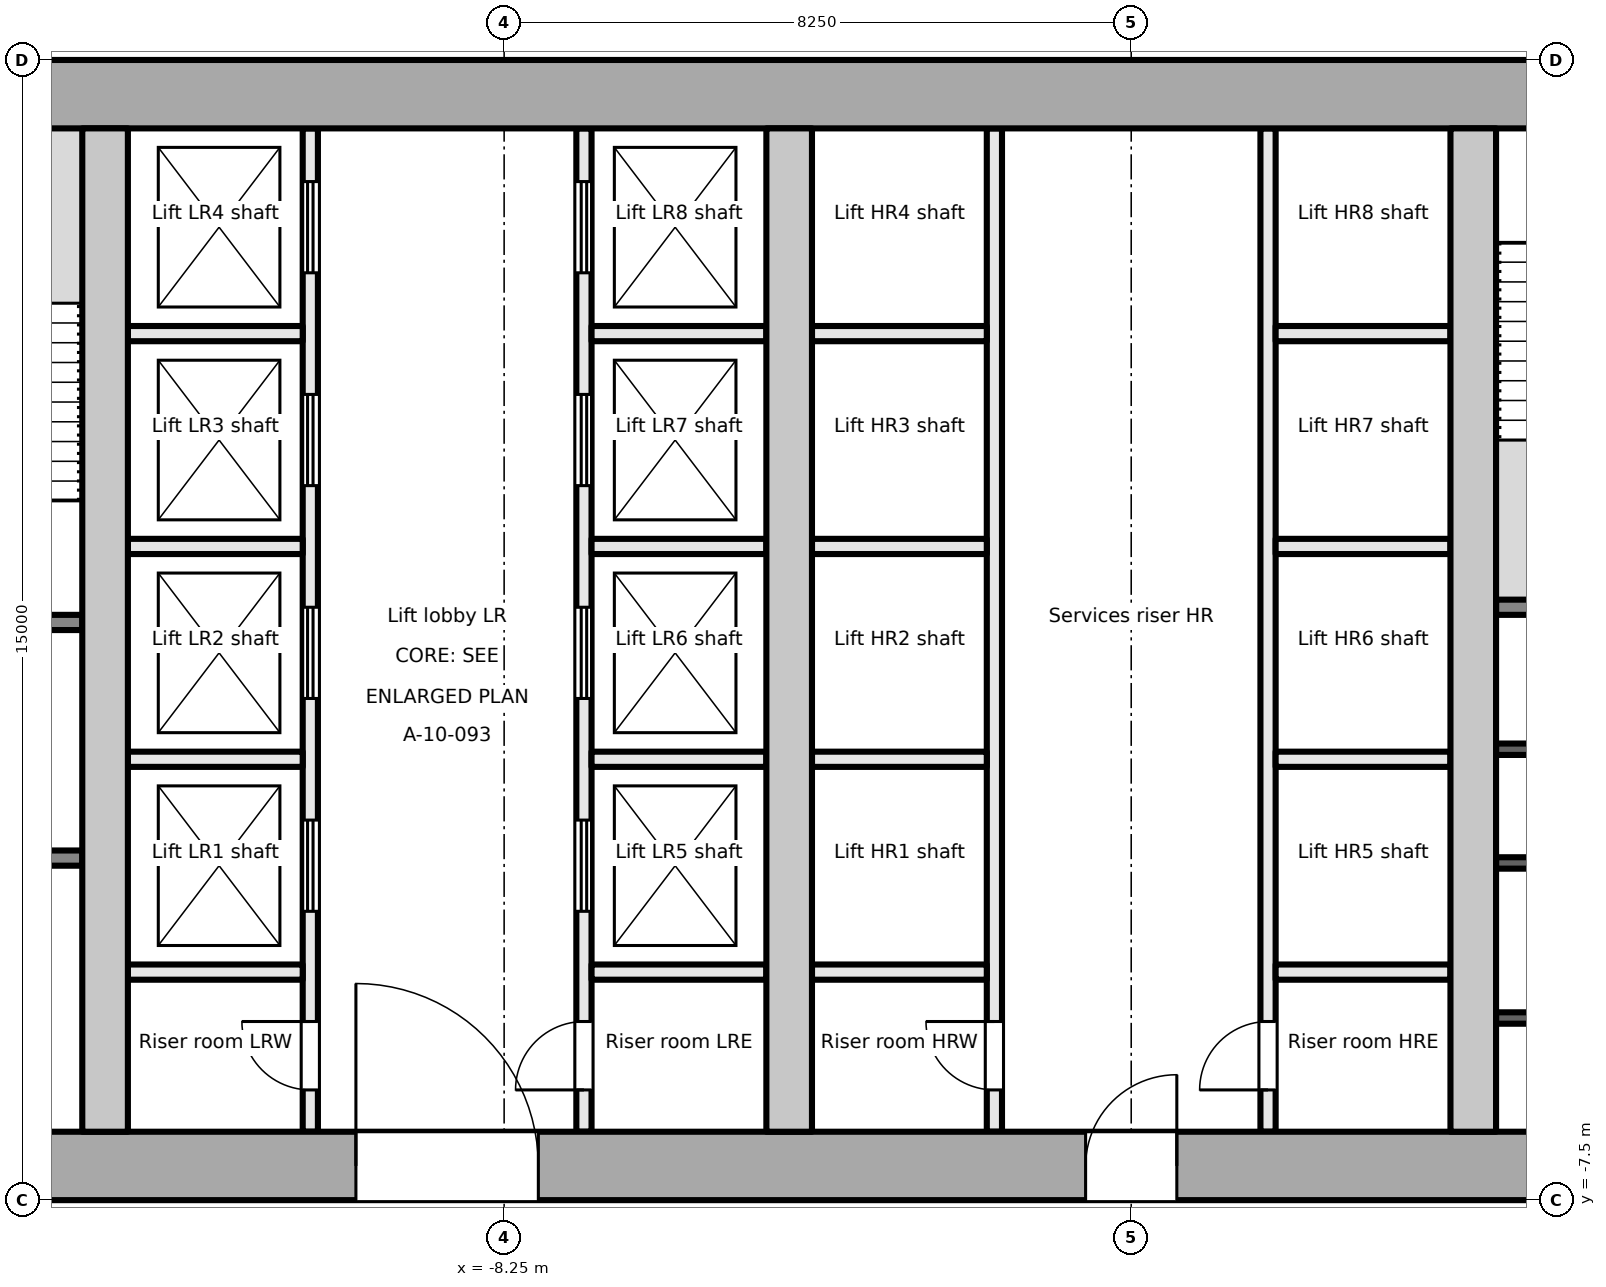
"""IFC4 building model, lengths in metres.
Left out: names, types, materials, properties, quantities, classifications, styles, units other than length and angle.
Written with IfcOpenShell. Run it as: python <this file> out.ifc"""

import sys

from ifc_helpers import new_model, si_unit, direction, frame, frame_2d, origin, place, context, subcontext, project, spatial, rectangle, extrude, element, fill, save


model = new_model("IFC4")
c1 = context("Model", 3, precision=1e-05, world=origin(), true_north=direction((0.0, 1.0)))
c2 = subcontext(c1, "Body", "Model", "MODEL_VIEW")
j1 = project(units=[si_unit("LENGTHUNIT", "METRE"), si_unit("PLANEANGLEUNIT", "RADIAN")], contexts=[c1])
p1 = place(None, origin())
s1 = spatial("IfcSite", under=j1, at=p1, CompositionType="ELEMENT")
p2 = place(p1, origin())
s2 = spatial("IfcBuilding", under=s1, at=p2, CompositionType="ELEMENT")
p3 = place(p2, frame((0.0, 0.0, 99.7)))
s3 = spatial("IfcBuildingStorey", under=s2, at=p3, CompositionType="ELEMENT", Elevation=99.7)
p4 = place(p3, frame((-18.0, -7.05, -0.2), z_axis=(0.0, 0.0, 1.0), x_axis=(1.0, 0.0, 0.0)))
e1 = element("IfcWall", 1, at=p4, inside=s3, PredefinedType="SHEAR", context=c2, shape_type="SweptSolid", body=[
    extrude(rectangle(XDim=36.0, YDim=0.9, at=frame_2d((18.0, 0.0))), origin(), (0.0, 0.0, 1.0), 4.0),
])
p5 = place(p4, frame((7.8, 0.0, 0.2)))
e2 = element("IfcOpeningElement", 2, at=p5, cuts=e1, PredefinedType="OPENING", context=c2, shape_type="SweptSolid", body=[
    extrude(rectangle(XDim=2.4, YDim=2.1, at=frame_2d((1.2, 1.05))), frame((0.0, 0.46, 0.0), z_axis=(0.0, -1.0, 0.0), x_axis=(1.0, 0.0, 0.0)), (0.0, 0.0, 1.0), 0.921),
])
p6 = place(p4, frame((17.4, 0.0, 0.2)))
e3 = element("IfcOpeningElement", 3, at=p6, cuts=e1, PredefinedType="OPENING", context=c2, shape_type="SweptSolid", body=[
    extrude(rectangle(XDim=1.2, YDim=2.1, at=frame_2d((0.6, 1.05))), frame((0.0, 0.46, 0.0), z_axis=(0.0, -1.0, 0.0), x_axis=(1.0, 0.0, 0.0)), (0.0, 0.0, 1.0), 0.921),
])
p7 = place(p4, frame((26.1, 0.0, 0.2)))
e4 = element("IfcOpeningElement", 4, at=p7, cuts=e1, PredefinedType="OPENING", context=c2, shape_type="SweptSolid", body=[
    extrude(rectangle(XDim=2.4, YDim=2.1, at=frame_2d((1.2, 1.05))), frame((0.0, 0.46, 0.0), z_axis=(0.0, -1.0, 0.0), x_axis=(1.0, 0.0, 0.0)), (0.0, 0.0, 1.0), 0.921),
])
p8 = place(p3, frame((-18.0, 7.05, -0.2), z_axis=(0.0, 0.0, 1.0), x_axis=(1.0, 0.0, 0.0)))
e5 = element("IfcWall", 5, at=p8, inside=s3, PredefinedType="SHEAR", context=c2, shape_type="SweptSolid", body=[
    extrude(rectangle(XDim=36.0, YDim=0.9, at=frame_2d((18.0, 0.0))), origin(), (0.0, 0.0, 1.0), 4.0),
])
for number, where, z_axis, x_axis in (
    (6, (-13.5, -6.6, -0.2), (0.0, 0.0, 1.0), (0.0, 1.0, 0.0)),
    (7, (-4.5, -6.6, -0.2), (0.0, 0.0, 1.0), (0.0, 1.0, 0.0)),
    (8, (4.5, -6.6, -0.2), (0.0, 0.0, 1.0), (0.0, 1.0, 0.0)),
):
    element("IfcWall", number, at=place(p3, frame(where, z_axis=z_axis, x_axis=x_axis)), inside=s3, PredefinedType="SHEAR", context=c2, shape_type="SweptSolid", body=[
        extrude(rectangle(XDim=13.2, YDim=0.6, at=frame_2d((6.6, 0.0))), origin(), (0.0, 0.0, 1.0), 4.0),
    ])
p9 = place(p3, frame((-17.1, -3.0, 0.0), z_axis=(0.0, 0.0, 1.0), x_axis=(1.0, 0.0, 0.0)))
e9 = element("IfcWall", 9, at=p9, inside=s3, PredefinedType="PARTITIONING", context=c2, shape_type="SweptSolid", body=[
    extrude(rectangle(XDim=3.3, YDim=0.2, at=frame_2d((1.65, 0.0))), origin(), (0.0, 0.0, 1.0), 3.8),
])
p10 = place(p9, frame((1.1, 0.0, 0.0)))
e10 = element("IfcOpeningElement", 10, at=p10, cuts=e9, PredefinedType="OPENING", context=c2, shape_type="SweptSolid", body=[
    extrude(rectangle(XDim=1.1, YDim=2.1, at=frame_2d((0.55, 1.05))), frame((0.0, 0.111, 0.0), z_axis=(0.0, -1.0, 0.0), x_axis=(1.0, 0.0, 0.0)), (0.0, 0.0, 1.0), 0.221),
])
p11 = place(p3, frame((-17.1, 0.1, 0.0), z_axis=(0.0, 0.0, 1.0), x_axis=(1.0, 0.0, 0.0)))
e11 = element("IfcWall", 11, at=p11, inside=s3, PredefinedType="PARTITIONING", context=c2, shape_type="SweptSolid", body=[
    extrude(rectangle(XDim=3.3, YDim=0.2, at=frame_2d((1.65, 0.0))), origin(), (0.0, 0.0, 1.0), 3.8),
])
p12 = place(p11, frame((1.1, 0.0, 0.0)))
e12 = element("IfcOpeningElement", 12, at=p12, cuts=e11, PredefinedType="OPENING", context=c2, shape_type="SweptSolid", body=[
    extrude(rectangle(XDim=1.1, YDim=2.1, at=frame_2d((0.55, 1.05))), frame((0.0, 0.111, 0.0), z_axis=(0.0, -1.0, 0.0), x_axis=(1.0, 0.0, 0.0)), (0.0, 0.0, 1.0), 0.221),
])
p13 = place(p3, frame((-10.8, -6.6, 0.0), z_axis=(0.0, 0.0, 1.0), x_axis=(0.0, 1.0, 0.0)))
e13 = element("IfcWall", 13, at=p13, inside=s3, PredefinedType="PARTITIONING", context=c2, shape_type="SweptSolid", body=[
    extrude(rectangle(XDim=13.2, YDim=0.2, at=frame_2d((6.6, 0.0))), origin(), (0.0, 0.0, 1.0), 3.8),
])
p14 = place(p13, frame((0.55, 0.0, 0.0)))
e14 = element("IfcOpeningElement", 14, at=p14, cuts=e13, PredefinedType="OPENING", context=c2, shape_type="SweptSolid", body=[
    extrude(rectangle(XDim=0.9, YDim=2.1, at=frame_2d((0.45, 1.05))), frame((0.0, 0.111, 0.0), z_axis=(0.0, -1.0, 0.0), x_axis=(1.0, 0.0, 0.0)), (0.0, 0.0, 1.0), 0.221),
])
p15 = place(p13, frame((2.9, 0.0, 0.0)))
e15 = element("IfcOpeningElement", 15, at=p15, cuts=e13, PredefinedType="OPENING", context=c2, shape_type="SweptSolid", body=[
    extrude(rectangle(XDim=1.2, YDim=2.1, at=frame_2d((0.6, 1.05))), frame((0.0, 0.111, 0.0), z_axis=(0.0, -1.0, 0.0), x_axis=(1.0, 0.0, 0.0)), (0.0, 0.0, 1.0), 0.221),
])
p16 = place(p13, frame((5.7, 0.0, 0.0)))
e16 = element("IfcOpeningElement", 16, at=p16, cuts=e13, PredefinedType="OPENING", context=c2, shape_type="SweptSolid", body=[
    extrude(rectangle(XDim=1.2, YDim=2.1, at=frame_2d((0.6, 1.05))), frame((0.0, 0.111, 0.0), z_axis=(0.0, -1.0, 0.0), x_axis=(1.0, 0.0, 0.0)), (0.0, 0.0, 1.0), 0.221),
])
p17 = place(p13, frame((8.5, 0.0, 0.0)))
e17 = element("IfcOpeningElement", 17, at=p17, cuts=e13, PredefinedType="OPENING", context=c2, shape_type="SweptSolid", body=[
    extrude(rectangle(XDim=1.2, YDim=2.1, at=frame_2d((0.6, 1.05))), frame((0.0, 0.111, 0.0), z_axis=(0.0, -1.0, 0.0), x_axis=(1.0, 0.0, 0.0)), (0.0, 0.0, 1.0), 0.221),
])
p18 = place(p13, frame((11.3, 0.0, 0.0)))
e18 = element("IfcOpeningElement", 18, at=p18, cuts=e13, PredefinedType="OPENING", context=c2, shape_type="SweptSolid", body=[
    extrude(rectangle(XDim=1.2, YDim=2.1, at=frame_2d((0.6, 1.05))), frame((0.0, 0.111, 0.0), z_axis=(0.0, -1.0, 0.0), x_axis=(1.0, 0.0, 0.0)), (0.0, 0.0, 1.0), 0.221),
])
p19 = place(p3, frame((-7.2, -6.6, 0.0), z_axis=(0.0, 0.0, 1.0), x_axis=(0.0, 1.0, 0.0)))
e19 = element("IfcWall", 19, at=p19, inside=s3, PredefinedType="PARTITIONING", context=c2, shape_type="SweptSolid", body=[
    extrude(rectangle(XDim=13.2, YDim=0.2, at=frame_2d((6.6, 0.0))), origin(), (0.0, 0.0, 1.0), 3.8),
])
p20 = place(p19, frame((0.55, 0.0, 0.0)))
e20 = element("IfcOpeningElement", 20, at=p20, cuts=e19, PredefinedType="OPENING", context=c2, shape_type="SweptSolid", body=[
    extrude(rectangle(XDim=0.9, YDim=2.1, at=frame_2d((0.45, 1.05))), frame((0.0, 0.111, 0.0), z_axis=(0.0, -1.0, 0.0), x_axis=(1.0, 0.0, 0.0)), (0.0, 0.0, 1.0), 0.221),
])
p21 = place(p19, frame((2.9, 0.0, 0.0)))
e21 = element("IfcOpeningElement", 21, at=p21, cuts=e19, PredefinedType="OPENING", context=c2, shape_type="SweptSolid", body=[
    extrude(rectangle(XDim=1.2, YDim=2.1, at=frame_2d((0.6, 1.05))), frame((0.0, 0.111, 0.0), z_axis=(0.0, -1.0, 0.0), x_axis=(1.0, 0.0, 0.0)), (0.0, 0.0, 1.0), 0.221),
])
p22 = place(p19, frame((5.7, 0.0, 0.0)))
e22 = element("IfcOpeningElement", 22, at=p22, cuts=e19, PredefinedType="OPENING", context=c2, shape_type="SweptSolid", body=[
    extrude(rectangle(XDim=1.2, YDim=2.1, at=frame_2d((0.6, 1.05))), frame((0.0, 0.111, 0.0), z_axis=(0.0, -1.0, 0.0), x_axis=(1.0, 0.0, 0.0)), (0.0, 0.0, 1.0), 0.221),
])
p23 = place(p19, frame((8.5, 0.0, 0.0)))
e23 = element("IfcOpeningElement", 23, at=p23, cuts=e19, PredefinedType="OPENING", context=c2, shape_type="SweptSolid", body=[
    extrude(rectangle(XDim=1.2, YDim=2.1, at=frame_2d((0.6, 1.05))), frame((0.0, 0.111, 0.0), z_axis=(0.0, -1.0, 0.0), x_axis=(1.0, 0.0, 0.0)), (0.0, 0.0, 1.0), 0.221),
])
p24 = place(p19, frame((11.3, 0.0, 0.0)))
e24 = element("IfcOpeningElement", 24, at=p24, cuts=e19, PredefinedType="OPENING", context=c2, shape_type="SweptSolid", body=[
    extrude(rectangle(XDim=1.2, YDim=2.1, at=frame_2d((0.6, 1.05))), frame((0.0, 0.111, 0.0), z_axis=(0.0, -1.0, 0.0), x_axis=(1.0, 0.0, 0.0)), (0.0, 0.0, 1.0), 0.221),
])
for number, where, z_axis, x_axis in (
    (25, (-13.2, -1.7, 0.0), (0.0, 0.0, 1.0), (1.0, 0.0, 0.0)),
    (26, (-13.2, 1.1, 0.0), (0.0, 0.0, 1.0), (1.0, 0.0, 0.0)),
    (27, (-13.2, 3.9, 0.0), (0.0, 0.0, 1.0), (1.0, 0.0, 0.0)),
    (28, (-13.2, -4.5, 0.0), (0.0, 0.0, 1.0), (1.0, 0.0, 0.0)),
    (29, (-7.1, -1.7, 0.0), (0.0, 0.0, 1.0), (1.0, 0.0, 0.0)),
    (30, (-7.1, 1.1, 0.0), (0.0, 0.0, 1.0), (1.0, 0.0, 0.0)),
    (31, (-7.1, 3.9, 0.0), (0.0, 0.0, 1.0), (1.0, 0.0, 0.0)),
    (32, (-7.1, -4.5, 0.0), (0.0, 0.0, 1.0), (1.0, 0.0, 0.0)),
):
    element("IfcWall", number, at=place(p3, frame(where, z_axis=z_axis, x_axis=x_axis)), inside=s3, PredefinedType="PARTITIONING", context=c2, shape_type="SweptSolid", body=[
        extrude(rectangle(XDim=2.3, YDim=0.2, at=frame_2d((1.15, 0.0))), origin(), (0.0, 0.0, 1.0), 3.8),
    ])
p25 = place(p3, frame((-1.8, -6.6, 0.0), z_axis=(0.0, 0.0, 1.0), x_axis=(0.0, 1.0, 0.0)))
e33 = element("IfcWall", 33, at=p25, inside=s3, PredefinedType="PARTITIONING", context=c2, shape_type="SweptSolid", body=[
    extrude(rectangle(XDim=13.2, YDim=0.2, at=frame_2d((6.6, 0.0))), origin(), (0.0, 0.0, 1.0), 3.8),
])
p26 = place(p25, frame((0.55, 0.0, 0.0)))
e34 = element("IfcOpeningElement", 34, at=p26, cuts=e33, PredefinedType="OPENING", context=c2, shape_type="SweptSolid", body=[
    extrude(rectangle(XDim=0.9, YDim=2.1, at=frame_2d((0.45, 1.05))), frame((0.0, 0.111, 0.0), z_axis=(0.0, -1.0, 0.0), x_axis=(1.0, 0.0, 0.0)), (0.0, 0.0, 1.0), 0.221),
])
p27 = place(p3, frame((1.8, -6.6, 0.0), z_axis=(0.0, 0.0, 1.0), x_axis=(0.0, 1.0, 0.0)))
e35 = element("IfcWall", 35, at=p27, inside=s3, PredefinedType="PARTITIONING", context=c2, shape_type="SweptSolid", body=[
    extrude(rectangle(XDim=13.2, YDim=0.2, at=frame_2d((6.6, 0.0))), origin(), (0.0, 0.0, 1.0), 3.8),
])
p28 = place(p27, frame((0.55, 0.0, 0.0)))
e36 = element("IfcOpeningElement", 36, at=p28, cuts=e35, PredefinedType="OPENING", context=c2, shape_type="SweptSolid", body=[
    extrude(rectangle(XDim=0.9, YDim=2.1, at=frame_2d((0.45, 1.05))), frame((0.0, 0.111, 0.0), z_axis=(0.0, -1.0, 0.0), x_axis=(1.0, 0.0, 0.0)), (0.0, 0.0, 1.0), 0.221),
])
for number, where, z_axis, x_axis in (
    (37, (-4.2, -1.7, 0.0), (0.0, 0.0, 1.0), (1.0, 0.0, 0.0)),
    (38, (-4.2, 1.1, 0.0), (0.0, 0.0, 1.0), (1.0, 0.0, 0.0)),
    (39, (-4.2, 3.9, 0.0), (0.0, 0.0, 1.0), (1.0, 0.0, 0.0)),
    (40, (-4.2, -4.5, 0.0), (0.0, 0.0, 1.0), (1.0, 0.0, 0.0)),
    (41, (1.9, -1.7, 0.0), (0.0, 0.0, 1.0), (1.0, 0.0, 0.0)),
    (42, (1.9, 1.1, 0.0), (0.0, 0.0, 1.0), (1.0, 0.0, 0.0)),
    (43, (1.9, 3.9, 0.0), (0.0, 0.0, 1.0), (1.0, 0.0, 0.0)),
    (44, (1.9, -4.5, 0.0), (0.0, 0.0, 1.0), (1.0, 0.0, 0.0)),
):
    element("IfcWall", number, at=place(p3, frame(where, z_axis=z_axis, x_axis=x_axis)), inside=s3, PredefinedType="PARTITIONING", context=c2, shape_type="SweptSolid", body=[
        extrude(rectangle(XDim=2.3, YDim=0.2, at=frame_2d((1.15, 0.0))), origin(), (0.0, 0.0, 1.0), 3.8),
    ])
p29 = place(p3, frame((4.8, 0.3, 0.0), z_axis=(0.0, 0.0, 1.0), x_axis=(1.0, 0.0, 0.0)))
e45 = element("IfcWall", 45, at=p29, inside=s3, PredefinedType="PARTITIONING", context=c2, shape_type="SweptSolid", body=[
    extrude(rectangle(XDim=3.15, YDim=0.2, at=frame_2d((1.575, 0.0))), origin(), (0.0, 0.0, 1.0), 3.8),
])
for number, where, z_axis, x_axis in (
    (46, (4.8, -5.104, 0.0), (0.0, 0.0, 1.0), (1.0, 0.0, 0.0)),
    (47, (4.8, -3.064, 0.0), (0.0, 0.0, 1.0), (1.0, 0.0, 0.0)),
    (48, (4.8, -1.568, 0.0), (0.0, 0.0, 1.0), (1.0, 0.0, 0.0)),
):
    element("IfcWall", number, at=place(p3, frame(where, z_axis=z_axis, x_axis=x_axis)), inside=s3, PredefinedType="PARTITIONING", context=c2, shape_type="SweptSolid", body=[
        extrude(rectangle(XDim=3.15, YDim=0.15, at=frame_2d((1.575, 0.0))), origin(), (0.0, 0.0, 1.0), 3.8),
    ])
p30 = place(p14, origin())
e49 = element("IfcDoor", 49, at=p30, inside=s3, OperationType="SINGLE_SWING_RIGHT", PredefinedType="DOOR", context=c2, shape_type="SweptSolid", body=[
    extrude(rectangle(XDim=0.9, YDim=2.1, at=frame_2d((0.45, 1.05))), frame((0.0, 0.025, 0.0), z_axis=(0.0, -1.0, 0.0), x_axis=(1.0, 0.0, 0.0)), (0.0, 0.0, 1.0), 0.05),
])
fill(e14, e49)
p31 = place(p15, origin())
e50 = element("IfcDoor", 50, at=p31, inside=s3, OperationType="DOUBLE_DOOR_SLIDING", PredefinedType="DOOR", context=c2, shape_type="SweptSolid", body=[
    extrude(rectangle(XDim=1.2, YDim=2.1, at=frame_2d((0.6, 1.05))), frame((0.0, 0.025, 0.0), z_axis=(0.0, -1.0, 0.0), x_axis=(1.0, 0.0, 0.0)), (0.0, 0.0, 1.0), 0.05),
])
fill(e15, e50)
p32 = place(p16, origin())
e51 = element("IfcDoor", 51, at=p32, inside=s3, OperationType="DOUBLE_DOOR_SLIDING", PredefinedType="DOOR", context=c2, shape_type="SweptSolid", body=[
    extrude(rectangle(XDim=1.2, YDim=2.1, at=frame_2d((0.6, 1.05))), frame((0.0, 0.025, 0.0), z_axis=(0.0, -1.0, 0.0), x_axis=(1.0, 0.0, 0.0)), (0.0, 0.0, 1.0), 0.05),
])
fill(e16, e51)
p33 = place(p17, origin())
e52 = element("IfcDoor", 52, at=p33, inside=s3, OperationType="DOUBLE_DOOR_SLIDING", PredefinedType="DOOR", context=c2, shape_type="SweptSolid", body=[
    extrude(rectangle(XDim=1.2, YDim=2.1, at=frame_2d((0.6, 1.05))), frame((0.0, 0.025, 0.0), z_axis=(0.0, -1.0, 0.0), x_axis=(1.0, 0.0, 0.0)), (0.0, 0.0, 1.0), 0.05),
])
fill(e17, e52)
p34 = place(p18, origin())
e53 = element("IfcDoor", 53, at=p34, inside=s3, OperationType="DOUBLE_DOOR_SLIDING", PredefinedType="DOOR", context=c2, shape_type="SweptSolid", body=[
    extrude(rectangle(XDim=1.2, YDim=2.1, at=frame_2d((0.6, 1.05))), frame((0.0, 0.025, 0.0), z_axis=(0.0, -1.0, 0.0), x_axis=(1.0, 0.0, 0.0)), (0.0, 0.0, 1.0), 0.05),
])
fill(e18, e53)
p35 = place(p20, origin())
e54 = element("IfcDoor", 54, at=p35, inside=s3, OperationType="SINGLE_SWING_LEFT", PredefinedType="DOOR", context=c2, shape_type="SweptSolid", body=[
    extrude(rectangle(XDim=0.9, YDim=2.1, at=frame_2d((0.45, 1.05))), frame((0.0, 0.025, 0.0), z_axis=(0.0, -1.0, 0.0), x_axis=(1.0, 0.0, 0.0)), (0.0, 0.0, 1.0), 0.05),
])
fill(e20, e54)
p36 = place(p21, origin())
e55 = element("IfcDoor", 55, at=p36, inside=s3, OperationType="DOUBLE_DOOR_SLIDING", PredefinedType="DOOR", context=c2, shape_type="SweptSolid", body=[
    extrude(rectangle(XDim=1.2, YDim=2.1, at=frame_2d((0.6, 1.05))), frame((0.0, 0.025, 0.0), z_axis=(0.0, -1.0, 0.0), x_axis=(1.0, 0.0, 0.0)), (0.0, 0.0, 1.0), 0.05),
])
fill(e21, e55)
p37 = place(p22, origin())
e56 = element("IfcDoor", 56, at=p37, inside=s3, OperationType="DOUBLE_DOOR_SLIDING", PredefinedType="DOOR", context=c2, shape_type="SweptSolid", body=[
    extrude(rectangle(XDim=1.2, YDim=2.1, at=frame_2d((0.6, 1.05))), frame((0.0, 0.025, 0.0), z_axis=(0.0, -1.0, 0.0), x_axis=(1.0, 0.0, 0.0)), (0.0, 0.0, 1.0), 0.05),
])
fill(e22, e56)
p38 = place(p23, origin())
e57 = element("IfcDoor", 57, at=p38, inside=s3, OperationType="DOUBLE_DOOR_SLIDING", PredefinedType="DOOR", context=c2, shape_type="SweptSolid", body=[
    extrude(rectangle(XDim=1.2, YDim=2.1, at=frame_2d((0.6, 1.05))), frame((0.0, 0.025, 0.0), z_axis=(0.0, -1.0, 0.0), x_axis=(1.0, 0.0, 0.0)), (0.0, 0.0, 1.0), 0.05),
])
fill(e23, e57)
p39 = place(p24, origin())
e58 = element("IfcDoor", 58, at=p39, inside=s3, OperationType="DOUBLE_DOOR_SLIDING", PredefinedType="DOOR", context=c2, shape_type="SweptSolid", body=[
    extrude(rectangle(XDim=1.2, YDim=2.1, at=frame_2d((0.6, 1.05))), frame((0.0, 0.025, 0.0), z_axis=(0.0, -1.0, 0.0), x_axis=(1.0, 0.0, 0.0)), (0.0, 0.0, 1.0), 0.05),
])
fill(e24, e58)
p40 = place(p5, origin())
e59 = element("IfcDoor", 59, at=p40, inside=s3, OperationType="DOUBLE_DOOR_DOUBLE_SWING", PredefinedType="DOOR", context=c2, shape_type="SweptSolid", body=[
    extrude(rectangle(XDim=2.4, YDim=2.1, at=frame_2d((1.2, 1.05))), frame((0.0, 0.025, 0.0), z_axis=(0.0, -1.0, 0.0), x_axis=(1.0, 0.0, 0.0)), (0.0, 0.0, 1.0), 0.05),
])
fill(e2, e59)
p41 = place(p26, origin())
e60 = element("IfcDoor", 60, at=p41, inside=s3, OperationType="SINGLE_SWING_RIGHT", PredefinedType="DOOR", context=c2, shape_type="SweptSolid", body=[
    extrude(rectangle(XDim=0.9, YDim=2.1, at=frame_2d((0.45, 1.05))), frame((0.0, 0.025, 0.0), z_axis=(0.0, -1.0, 0.0), x_axis=(1.0, 0.0, 0.0)), (0.0, 0.0, 1.0), 0.05),
])
fill(e34, e60)
p42 = place(p28, origin())
e61 = element("IfcDoor", 61, at=p42, inside=s3, OperationType="SINGLE_SWING_LEFT", PredefinedType="DOOR", context=c2, shape_type="SweptSolid", body=[
    extrude(rectangle(XDim=0.9, YDim=2.1, at=frame_2d((0.45, 1.05))), frame((0.0, 0.025, 0.0), z_axis=(0.0, -1.0, 0.0), x_axis=(1.0, 0.0, 0.0)), (0.0, 0.0, 1.0), 0.05),
])
fill(e36, e61)
p43 = place(p6, origin())
e62 = element("IfcDoor", 62, at=p43, inside=s3, OperationType="SINGLE_SWING_RIGHT", PredefinedType="DOOR", context=c2, shape_type="SweptSolid", body=[
    extrude(rectangle(XDim=1.2, YDim=2.1, at=frame_2d((0.6, 1.05))), frame((0.0, 0.025, 0.0), z_axis=(0.0, -1.0, 0.0), x_axis=(1.0, 0.0, 0.0)), (0.0, 0.0, 1.0), 0.05),
])
fill(e3, e62)
save(model, sys.argv[1])
